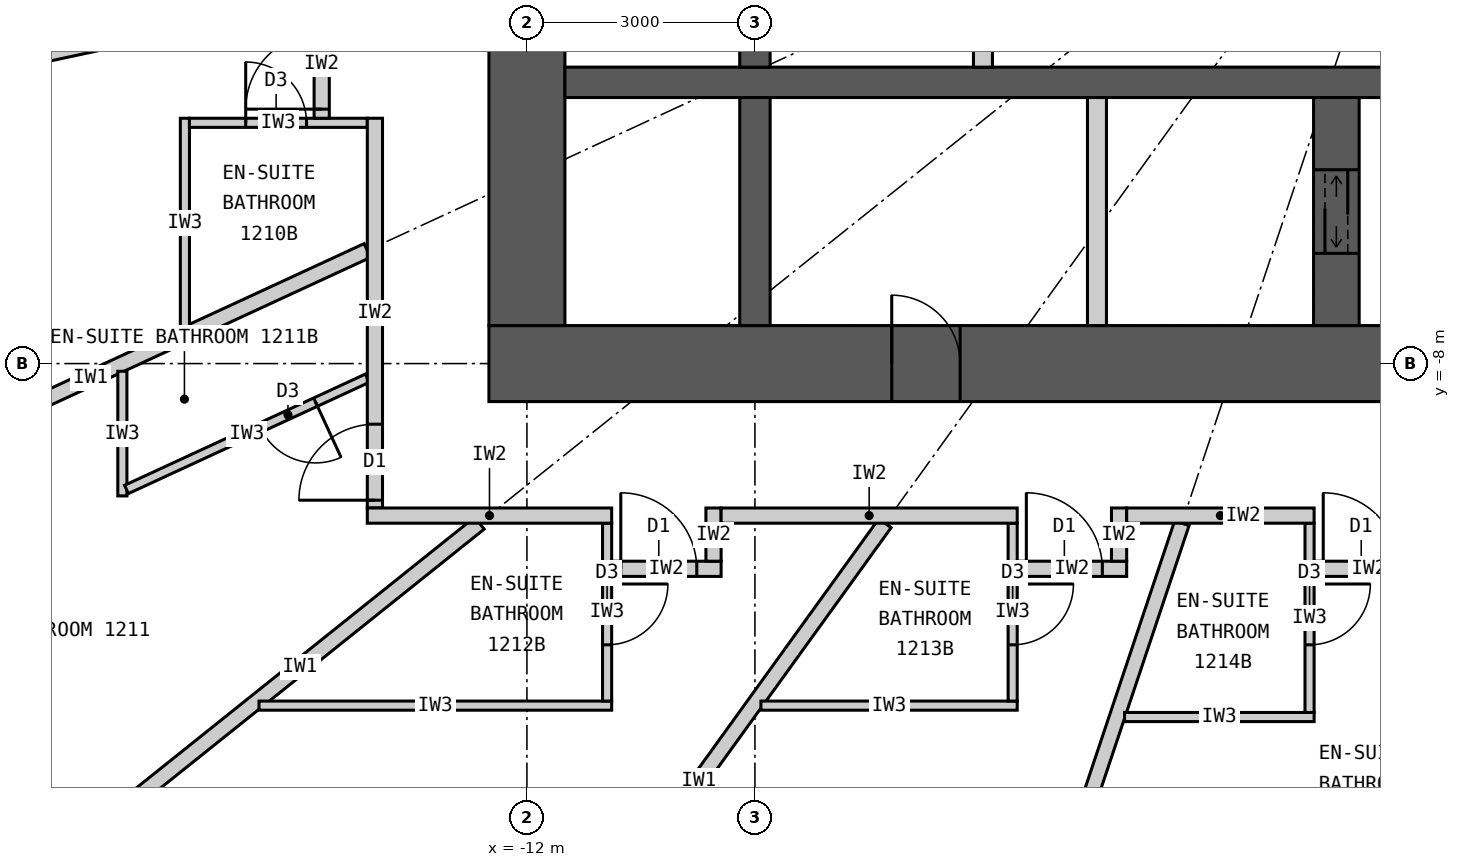
"""IFC4 building model, lengths in metres.
Left out: names, types, materials, properties, quantities, classifications, styles, units other than length and angle.
Written with IfcOpenShell. Run it as: python <this file> out.ifc"""

import sys

from ifc_helpers import new_model, si_unit, direction, frame, frame_2d, origin, place, context, subcontext, project, spatial, rectangle, extrude, element, fill, save


model = new_model("IFC4")
c1 = context("Model", 3, precision=1e-05, world=origin(), true_north=direction((0.0, 1.0)))
c2 = subcontext(c1, "Body", "Model", "MODEL_VIEW")
j1 = project(units=[si_unit("LENGTHUNIT", "METRE"), si_unit("PLANEANGLEUNIT", "RADIAN")], contexts=[c1])
p1 = place(None, origin())
s1 = spatial("IfcSite", under=j1, at=p1, CompositionType="ELEMENT")
p2 = place(p1, origin())
s2 = spatial("IfcBuilding", under=s1, at=p2, CompositionType="ELEMENT")
p3 = place(p2, frame((0.0, 0.0, 54.0)))
s3 = spatial("IfcBuildingStorey", under=s2, at=p3, CompositionType="ELEMENT", Elevation=54.0)
p4 = place(p3, frame((12.5, -8.0, 0.0), z_axis=(0.0, 0.0, 1.0), x_axis=(-1.0, 0.0, 0.0)))
e1 = element("IfcWall", 1, at=p4, inside=s3, PredefinedType="SHEAR", context=c2, shape_type="SweptSolid", body=[
    extrude(rectangle(XDim=25.0, YDim=1.0, at=frame_2d((12.5, 0.0))), origin(), (0.0, 0.0, 1.0), 3.3),
])
p5 = place(p4, frame((11.2, 0.0, 0.0)))
e2 = element("IfcOpeningElement", 2, at=p5, cuts=e1, PredefinedType="OPENING", context=c2, shape_type="SweptSolid", body=[
    extrude(rectangle(XDim=1.2, YDim=2.2, at=frame_2d((0.6, 1.1))), frame((0.0, 0.51, 0.0), z_axis=(0.0, -1.0, 0.0), x_axis=(1.0, 0.0, 0.0)), (0.0, 0.0, 1.0), 1.02),
])
p6 = place(p4, frame((18.8, 0.0, 0.0)))
e3 = element("IfcOpeningElement", 3, at=p6, cuts=e1, PredefinedType="OPENING", context=c2, shape_type="SweptSolid", body=[
    extrude(rectangle(XDim=0.9, YDim=2.2, at=frame_2d((0.45, 1.1))), frame((0.0, 0.51, 0.0), z_axis=(0.0, -1.0, 0.0), x_axis=(1.0, 0.0, 0.0)), (0.0, 0.0, 1.0), 1.02),
])
p7 = place(p3, frame((-12.0, 7.5, 0.0), z_axis=(0.0, 0.0, 1.0), x_axis=(0.0, -1.0, 0.0)))
e4 = element("IfcWall", 4, at=p7, inside=s3, PredefinedType="SHEAR", context=c2, shape_type="SweptSolid", body=[
    extrude(rectangle(XDim=15.0, YDim=1.0, at=frame_2d((7.5, 0.0))), origin(), (0.0, 0.0, 1.0), 3.3),
])
p8 = place(p7, frame((6.6, 0.0, 0.0)))
e5 = element("IfcOpeningElement", 5, at=p8, cuts=e4, PredefinedType="OPENING", context=c2, shape_type="SweptSolid", body=[
    extrude(rectangle(XDim=1.8, YDim=2.2, at=frame_2d((0.9, 1.1))), frame((0.0, 0.51, 0.0), z_axis=(0.0, -1.0, 0.0), x_axis=(1.0, 0.0, 0.0)), (0.0, 0.0, 1.0), 1.02),
])
p9 = place(p3, frame((-11.5, -4.3, 0.0), z_axis=(0.0, 0.0, 1.0), x_axis=(1.0, 0.0, 0.0)))
e6 = element("IfcWall", 6, at=p9, inside=s3, PredefinedType="SHEAR", context=c2, shape_type="SweptSolid", body=[
    extrude(rectangle(XDim=23.0, YDim=0.4, at=frame_2d((11.5, 0.0))), origin(), (0.0, 0.0, 1.0), 3.3),
])
p10 = place(p3, frame((-9.0, -4.1, 0.0), z_axis=(0.0, 0.0, 1.0), x_axis=(0.0, 1.0, 0.0)))
e7 = element("IfcWall", 7, at=p10, inside=s3, PredefinedType="SHEAR", context=c2, shape_type="SweptSolid", body=[
    extrude(rectangle(XDim=2.35, YDim=0.4, at=frame_2d((1.175, 0.0))), origin(), (0.0, 0.0, 1.0), 3.3),
])
p11 = place(p3, frame((-9.0, -7.5, 0.0), z_axis=(0.0, 0.0, 1.0), x_axis=(0.0, 1.0, 0.0)))
e8 = element("IfcWall", 8, at=p11, inside=s3, PredefinedType="SHEAR", context=c2, shape_type="SweptSolid", body=[
    extrude(rectangle(XDim=3.0, YDim=0.4, at=frame_2d((1.5, 0.0))), origin(), (0.0, 0.0, 1.0), 3.3),
])
p12 = place(p3, frame((-1.35, -7.5, 0.0), z_axis=(0.0, 0.0, 1.0), x_axis=(0.0, 1.0, 0.0)))
e9 = element("IfcWall", 9, at=p12, inside=s3, PredefinedType="SHEAR", context=c2, shape_type="SweptSolid", body=[
    extrude(rectangle(XDim=3.0, YDim=0.6, at=frame_2d((1.5, 0.0))), origin(), (0.0, 0.0, 1.0), 3.3),
])
p13 = place(p12, frame((0.95, 0.0, 0.0)))
e10 = element("IfcOpeningElement", 10, at=p13, cuts=e9, PredefinedType="OPENING", context=c2, shape_type="SweptSolid", body=[
    extrude(rectangle(XDim=1.1, YDim=2.2, at=frame_2d((0.55, 1.1))), frame((0.0, 0.31, 0.0), z_axis=(0.0, -1.0, 0.0), x_axis=(1.0, 0.0, 0.0)), (0.0, 0.0, 1.0), 0.62),
])
p14 = place(p3, frame((-4.5, -7.5, 0.0), z_axis=(0.0, 0.0, 1.0), x_axis=(0.0, 1.0, 0.0)))
e11 = element("IfcWall", 11, at=p14, inside=s3, PredefinedType="PARTITIONING", context=c2, shape_type="SweptSolid", body=[
    extrude(rectangle(XDim=3.0, YDim=0.25, at=frame_2d((1.5, 0.0))), origin(), (0.0, 0.0, 1.0), 3.3),
])
p15 = place(p3, frame((-6.0, -4.1, 0.0), z_axis=(0.0, 0.0, 1.0), x_axis=(0.0, 1.0, 0.0)))
e12 = element("IfcWall", 12, at=p15, inside=s3, PredefinedType="PARTITIONING", context=c2, shape_type="SweptSolid", body=[
    extrude(rectangle(XDim=2.35, YDim=0.25, at=frame_2d((1.175, 0.0))), origin(), (0.0, 0.0, 1.0), 3.3),
])
p16 = place(p3, frame((-14.1, -3.022, 0.0), z_axis=(0.0, 0.0, 1.0), x_axis=(-0.977790014929, -0.209586943072, 0.0)))
e13 = element("IfcWall", 13, at=p16, inside=s3, PredefinedType="PARTITIONING", context=c2, shape_type="SweptSolid", body=[
    extrude(rectangle(XDim=10.087, YDim=0.2, at=frame_2d((5.043, 0.0))), origin(), (0.0, 0.0, 1.0), 2.32),
])
p17 = place(p3, frame((-14.1, -6.512, 0.0), z_axis=(0.0, 0.0, 1.0), x_axis=(-0.907832871056, -0.419332181247, 0.0)))
e14 = element("IfcWall", 14, at=p17, inside=s3, PredefinedType="PARTITIONING", context=c2, shape_type="SweptSolid", body=[
    extrude(rectangle(XDim=8.023, YDim=0.2, at=frame_2d((4.011, 0.0))), origin(), (0.0, 0.0, 1.0), 2.32),
])
p18 = place(p3, frame((-12.625, -10.1, 0.0), z_axis=(0.0, 0.0, 1.0), x_axis=(-0.780892451574, -0.624665493744, 0.0)))
e15 = element("IfcWall", 15, at=p18, inside=s3, PredefinedType="PARTITIONING", context=c2, shape_type="SweptSolid", body=[
    extrude(rectangle(XDim=6.045, YDim=0.2, at=frame_2d((3.022, 0.0))), origin(), (0.0, 0.0, 1.0), 2.32),
])
p19 = place(p3, frame((-7.289, -10.1, 0.0), z_axis=(0.0, 0.0, 1.0), x_axis=(-0.585198353053, -0.810890182197, 0.0)))
e16 = element("IfcWall", 16, at=p19, inside=s3, PredefinedType="PARTITIONING", context=c2, shape_type="SweptSolid", body=[
    extrude(rectangle(XDim=8.36, YDim=0.2, at=frame_2d((4.18, 0.0))), origin(), (0.0, 0.0, 1.0), 2.32),
])
p20 = place(p3, frame((-3.383, -10.1, 0.0), z_axis=(0.0, 0.0, 1.0), x_axis=(-0.31759592231, -0.948226149256, 0.0)))
e17 = element("IfcWall", 17, at=p20, inside=s3, PredefinedType="PARTITIONING", context=c2, shape_type="SweptSolid", body=[
    extrude(rectangle(XDim=9.098, YDim=0.2, at=frame_2d((4.549, 0.0))), origin(), (0.0, 0.0, 1.0), 2.32),
])
p21 = place(p3, frame((-16.5, -7.521, 0.0), z_axis=(0.0, 0.0, 1.0), x_axis=(0.0, 1.0, 0.0)))
e18 = element("IfcWall", 18, at=p21, inside=s3, PredefinedType="PARTITIONING", context=c2, shape_type="SweptSolid", body=[
    extrude(rectangle(XDim=2.749, YDim=0.12, at=frame_2d((1.374, 0.0))), origin(), (0.0, 0.0, 1.0), 3.12),
])
p22 = place(p3, frame((-14.1, -4.833, 0.0), z_axis=(0.0, 0.0, 1.0), x_axis=(-1.0, 0.0, 0.0)))
e19 = element("IfcWall", 19, at=p22, inside=s3, PredefinedType="PARTITIONING", context=c2, shape_type="SweptSolid", body=[
    extrude(rectangle(XDim=2.34, YDim=0.12, at=frame_2d((1.17, 0.0))), origin(), (0.0, 0.0, 1.0), 3.12),
])
p23 = place(p22, frame((0.8, 0.0, 0.0)))
e20 = element("IfcOpeningElement", 20, at=p23, cuts=e19, PredefinedType="OPENING", context=c2, shape_type="SweptSolid", body=[
    extrude(rectangle(XDim=0.8, YDim=2.1, at=frame_2d((0.4, 1.05))), frame((0.0, 0.07, 0.0), z_axis=(0.0, -1.0, 0.0), x_axis=(1.0, 0.0, 0.0)), (0.0, 0.0, 1.0), 0.14),
])
p24 = place(p3, frame((-17.323, -8.101, 0.0), z_axis=(0.0, 0.0, 1.0), x_axis=(0.0, -1.0, 0.0)))
e21 = element("IfcWall", 21, at=p24, inside=s3, PredefinedType="PARTITIONING", context=c2, shape_type="SweptSolid", body=[
    extrude(rectangle(XDim=1.64, YDim=0.12, at=frame_2d((0.82, 0.0))), origin(), (0.0, 0.0, 1.0), 3.12),
])
p25 = place(p3, frame((-14.1, -8.193, 0.0), z_axis=(0.0, 0.0, 1.0), x_axis=(-0.907836493557, -0.419324338628, 0.0)))
e22 = element("IfcWall", 22, at=p25, inside=s3, PredefinedType="PARTITIONING", context=c2, shape_type="SweptSolid", body=[
    extrude(rectangle(XDim=3.49, YDim=0.12, at=frame_2d((1.745, 0.0))), origin(), (0.0, 0.0, 1.0), 3.12),
])
p26 = place(p25, frame((0.75, 0.0, 0.0)))
e23 = element("IfcOpeningElement", 23, at=p26, cuts=e22, PredefinedType="OPENING", context=c2, shape_type="SweptSolid", body=[
    extrude(rectangle(XDim=0.8, YDim=2.1, at=frame_2d((0.4, 1.05))), frame((0.0, 0.07, 0.0), z_axis=(0.0, -1.0, 0.0), x_axis=(1.0, 0.0, 0.0)), (0.0, 0.0, 1.0), 0.14),
])
p27 = place(p3, frame((-15.525, -12.5, 0.0), z_axis=(0.0, 0.0, 1.0), x_axis=(1.0, 0.0, 0.0)))
e24 = element("IfcWall", 24, at=p27, inside=s3, PredefinedType="PARTITIONING", context=c2, shape_type="SweptSolid", body=[
    extrude(rectangle(XDim=4.64, YDim=0.12, at=frame_2d((2.32, 0.0))), origin(), (0.0, 0.0, 1.0), 3.12),
])
p28 = place(p3, frame((-10.945, -10.1, 0.0), z_axis=(0.0, 0.0, 1.0), x_axis=(0.0, -1.0, 0.0)))
e25 = element("IfcWall", 25, at=p28, inside=s3, PredefinedType="PARTITIONING", context=c2, shape_type="SweptSolid", body=[
    extrude(rectangle(XDim=2.34, YDim=0.12, at=frame_2d((1.17, 0.0))), origin(), (0.0, 0.0, 1.0), 3.12),
])
p29 = place(p28, frame((0.8, 0.0, 0.0)))
e26 = element("IfcOpeningElement", 26, at=p29, cuts=e25, PredefinedType="OPENING", context=c2, shape_type="SweptSolid", body=[
    extrude(rectangle(XDim=0.8, YDim=2.1, at=frame_2d((0.4, 1.05))), frame((0.0, 0.07, 0.0), z_axis=(0.0, -1.0, 0.0), x_axis=(1.0, 0.0, 0.0)), (0.0, 0.0, 1.0), 0.14),
])
p30 = place(p3, frame((-8.921, -12.5, 0.0), z_axis=(0.0, 0.0, 1.0), x_axis=(1.0, 0.0, 0.0)))
e27 = element("IfcWall", 27, at=p30, inside=s3, PredefinedType="PARTITIONING", context=c2, shape_type="SweptSolid", body=[
    extrude(rectangle(XDim=3.372, YDim=0.12, at=frame_2d((1.686, 0.0))), origin(), (0.0, 0.0, 1.0), 3.12),
])
p31 = place(p3, frame((-5.609, -10.1, 0.0), z_axis=(0.0, 0.0, 1.0), x_axis=(0.0, -1.0, 0.0)))
e28 = element("IfcWall", 28, at=p31, inside=s3, PredefinedType="PARTITIONING", context=c2, shape_type="SweptSolid", body=[
    extrude(rectangle(XDim=2.34, YDim=0.12, at=frame_2d((1.17, 0.0))), origin(), (0.0, 0.0, 1.0), 3.12),
])
p32 = place(p31, frame((0.8, 0.0, 0.0)))
e29 = element("IfcOpeningElement", 29, at=p32, cuts=e28, PredefinedType="OPENING", context=c2, shape_type="SweptSolid", body=[
    extrude(rectangle(XDim=0.8, YDim=2.1, at=frame_2d((0.4, 1.05))), frame((0.0, 0.07, 0.0), z_axis=(0.0, -1.0, 0.0), x_axis=(1.0, 0.0, 0.0)), (0.0, 0.0, 1.0), 0.14),
])
p33 = place(p3, frame((-4.137, -12.65, 0.0), z_axis=(0.0, 0.0, 1.0), x_axis=(1.0, 0.0, 0.0)))
e30 = element("IfcWall", 30, at=p33, inside=s3, PredefinedType="PARTITIONING", context=c2, shape_type="SweptSolid", body=[
    extrude(rectangle(XDim=2.494, YDim=0.12, at=frame_2d((1.247, 0.0))), origin(), (0.0, 0.0, 1.0), 3.12),
])
p34 = place(p3, frame((-1.703, -10.1, 0.0), z_axis=(0.0, 0.0, 1.0), x_axis=(0.0, -1.0, 0.0)))
e31 = element("IfcWall", 31, at=p34, inside=s3, PredefinedType="PARTITIONING", context=c2, shape_type="SweptSolid", body=[
    extrude(rectangle(XDim=2.49, YDim=0.12, at=frame_2d((1.245, 0.0))), origin(), (0.0, 0.0, 1.0), 3.12),
])
p35 = place(p34, frame((0.8, 0.0, 0.0)))
e32 = element("IfcOpeningElement", 32, at=p35, cuts=e31, PredefinedType="OPENING", context=c2, shape_type="SweptSolid", body=[
    extrude(rectangle(XDim=0.8, YDim=2.1, at=frame_2d((0.4, 1.05))), frame((0.0, 0.07, 0.0), z_axis=(0.0, -1.0, 0.0), x_axis=(1.0, 0.0, 0.0)), (0.0, 0.0, 1.0), 0.14),
])
p36 = place(p3, frame((-14.7, -3.333, 0.0), z_axis=(0.0, 0.0, 1.0), x_axis=(0.0, -1.0, 0.0)))
e33 = element("IfcWall", 33, at=p36, inside=s3, PredefinedType="PARTITIONING", context=c2, shape_type="SweptSolid", body=[
    extrude(rectangle(XDim=1.44, YDim=0.2, at=frame_2d((0.72, 0.0))), origin(), (0.0, 0.0, 1.0), 3.12),
])
p37 = place(p36, frame((0.32, 0.0, 0.0)))
e34 = element("IfcOpeningElement", 34, at=p37, cuts=e33, PredefinedType="OPENING", context=c2, shape_type="SweptSolid", body=[
    extrude(rectangle(XDim=1.0, YDim=2.2, at=frame_2d((0.5, 1.1))), frame((0.0, 0.11, 0.0), z_axis=(0.0, -1.0, 0.0), x_axis=(1.0, 0.0, 0.0)), (0.0, 0.0, 1.0), 0.22),
])
p38 = place(p3, frame((-9.445, -10.7, 0.0), z_axis=(0.0, 0.0, 1.0), x_axis=(-1.0, 0.0, 0.0)))
e35 = element("IfcWall", 35, at=p38, inside=s3, PredefinedType="PARTITIONING", context=c2, shape_type="SweptSolid", body=[
    extrude(rectangle(XDim=1.44, YDim=0.2, at=frame_2d((0.72, 0.0))), origin(), (0.0, 0.0, 1.0), 3.12),
])
p39 = place(p38, frame((0.32, 0.0, 0.0)))
e36 = element("IfcOpeningElement", 36, at=p39, cuts=e35, PredefinedType="OPENING", context=c2, shape_type="SweptSolid", body=[
    extrude(rectangle(XDim=1.0, YDim=2.2, at=frame_2d((0.5, 1.1))), frame((0.0, 0.11, 0.0), z_axis=(0.0, -1.0, 0.0), x_axis=(1.0, 0.0, 0.0)), (0.0, 0.0, 1.0), 0.22),
])
p40 = place(p3, frame((-9.545, -9.9, 0.0), z_axis=(0.0, 0.0, 1.0), x_axis=(0.0, -1.0, 0.0)))
e37 = element("IfcWall", 37, at=p40, inside=s3, PredefinedType="PARTITIONING", context=c2, shape_type="SweptSolid", body=[
    extrude(rectangle(XDim=0.7, YDim=0.2, at=frame_2d((0.35, 0.0))), origin(), (0.0, 0.0, 1.0), 3.12),
])
p41 = place(p3, frame((-4.109, -10.7, 0.0), z_axis=(0.0, 0.0, 1.0), x_axis=(-1.0, 0.0, 0.0)))
e38 = element("IfcWall", 38, at=p41, inside=s3, PredefinedType="PARTITIONING", context=c2, shape_type="SweptSolid", body=[
    extrude(rectangle(XDim=1.44, YDim=0.2, at=frame_2d((0.72, 0.0))), origin(), (0.0, 0.0, 1.0), 3.12),
])
p42 = place(p41, frame((0.32, 0.0, 0.0)))
e39 = element("IfcOpeningElement", 39, at=p42, cuts=e38, PredefinedType="OPENING", context=c2, shape_type="SweptSolid", body=[
    extrude(rectangle(XDim=1.0, YDim=2.2, at=frame_2d((0.5, 1.1))), frame((0.0, 0.11, 0.0), z_axis=(0.0, -1.0, 0.0), x_axis=(1.0, 0.0, 0.0)), (0.0, 0.0, 1.0), 0.22),
])
p43 = place(p3, frame((-4.209, -9.9, 0.0), z_axis=(0.0, 0.0, 1.0), x_axis=(0.0, -1.0, 0.0)))
e40 = element("IfcWall", 40, at=p43, inside=s3, PredefinedType="PARTITIONING", context=c2, shape_type="SweptSolid", body=[
    extrude(rectangle(XDim=0.7, YDim=0.2, at=frame_2d((0.35, 0.0))), origin(), (0.0, 0.0, 1.0), 3.12),
])
p44 = place(p3, frame((-0.203, -10.7, 0.0), z_axis=(0.0, 0.0, 1.0), x_axis=(-1.0, 0.0, 0.0)))
e41 = element("IfcWall", 41, at=p44, inside=s3, PredefinedType="PARTITIONING", context=c2, shape_type="SweptSolid", body=[
    extrude(rectangle(XDim=1.44, YDim=0.2, at=frame_2d((0.72, 0.0))), origin(), (0.0, 0.0, 1.0), 3.12),
])
p45 = place(p44, frame((0.32, 0.0, 0.0)))
e42 = element("IfcOpeningElement", 42, at=p45, cuts=e41, PredefinedType="OPENING", context=c2, shape_type="SweptSolid", body=[
    extrude(rectangle(XDim=1.0, YDim=2.2, at=frame_2d((0.5, 1.1))), frame((0.0, 0.11, 0.0), z_axis=(0.0, -1.0, 0.0), x_axis=(1.0, 0.0, 0.0)), (0.0, 0.0, 1.0), 0.22),
])
p46 = place(p3, frame((-14.0, -4.772, 0.0), z_axis=(0.0, 0.0, 1.0), x_axis=(0.0, -1.0, 0.0)))
e43 = element("IfcWall", 43, at=p46, inside=s3, PredefinedType="PARTITIONING", context=c2, shape_type="SweptSolid", body=[
    extrude(rectangle(XDim=5.127, YDim=0.2, at=frame_2d((2.564, 0.0))), origin(), (0.0, 0.0, 1.0), 3.12),
])
p47 = place(p46, frame((4.025, 0.0, 0.0)))
e44 = element("IfcOpeningElement", 44, at=p47, cuts=e43, PredefinedType="OPENING", context=c2, shape_type="SweptSolid", body=[
    extrude(rectangle(XDim=1.0, YDim=2.2, at=frame_2d((0.5, 1.1))), frame((0.0, 0.11, 0.0), z_axis=(0.0, -1.0, 0.0), x_axis=(1.0, 0.0, 0.0)), (0.0, 0.0, 1.0), 0.22),
])
p48 = place(p3, frame((-1.643, -10.0, 0.0), z_axis=(0.0, 0.0, 1.0), x_axis=(-1.0, 0.0, 0.0)))
e45 = element("IfcWall", 45, at=p48, inside=s3, PredefinedType="PARTITIONING", context=c2, shape_type="SweptSolid", body=[
    extrude(rectangle(XDim=2.466, YDim=0.2, at=frame_2d((1.233, 0.0))), origin(), (0.0, 0.0, 1.0), 3.12),
])
p49 = place(p3, frame((-5.549, -10.0, 0.0), z_axis=(0.0, 0.0, 1.0), x_axis=(-1.0, 0.0, 0.0)))
e46 = element("IfcWall", 46, at=p49, inside=s3, PredefinedType="PARTITIONING", context=c2, shape_type="SweptSolid", body=[
    extrude(rectangle(XDim=3.896, YDim=0.2, at=frame_2d((1.948, 0.0))), origin(), (0.0, 0.0, 1.0), 3.12),
])
p50 = place(p3, frame((-10.885, -10.0, 0.0), z_axis=(0.0, 0.0, 1.0), x_axis=(-1.0, 0.0, 0.0)))
e47 = element("IfcWall", 47, at=p50, inside=s3, PredefinedType="PARTITIONING", context=c2, shape_type="SweptSolid", body=[
    extrude(rectangle(XDim=3.215, YDim=0.2, at=frame_2d((1.607, 0.0))), origin(), (0.0, 0.0, 1.0), 3.12),
])
p51 = place(p23, origin())
e48 = element("IfcDoor", 48, at=p51, inside=s3, OperationType="SINGLE_SWING_RIGHT", PredefinedType="DOOR", context=c2, shape_type="SweptSolid", body=[
    extrude(rectangle(XDim=0.8, YDim=2.1, at=frame_2d((0.4, 1.05))), frame((0.0, 0.025, 0.0), z_axis=(0.0, -1.0, 0.0), x_axis=(1.0, 0.0, 0.0)), (0.0, 0.0, 1.0), 0.05),
])
fill(e20, e48)
p52 = place(p37, origin())
e49 = element("IfcDoor", 49, at=p52, inside=s3, OperationType="SINGLE_SWING_RIGHT", PredefinedType="DOOR", context=c2, shape_type="SweptSolid", body=[
    extrude(rectangle(XDim=1.0, YDim=2.2, at=frame_2d((0.5, 1.1))), frame((0.0, 0.025, 0.0), z_axis=(0.0, -1.0, 0.0), x_axis=(1.0, 0.0, 0.0)), (0.0, 0.0, 1.0), 0.05),
])
fill(e34, e49)
p53 = place(p26, origin())
e50 = element("IfcDoor", 50, at=p53, inside=s3, OperationType="SINGLE_SWING_LEFT", PredefinedType="DOOR", context=c2, shape_type="SweptSolid", body=[
    extrude(rectangle(XDim=0.8, YDim=2.1, at=frame_2d((0.4, 1.05))), frame((0.0, 0.025, 0.0), z_axis=(0.0, -1.0, 0.0), x_axis=(1.0, 0.0, 0.0)), (0.0, 0.0, 1.0), 0.05),
])
fill(e23, e50)
p54 = place(p47, origin())
e51 = element("IfcDoor", 51, at=p54, inside=s3, OperationType="SINGLE_SWING_RIGHT", PredefinedType="DOOR", context=c2, shape_type="SweptSolid", body=[
    extrude(rectangle(XDim=1.0, YDim=2.2, at=frame_2d((0.5, 1.1))), frame((0.0, 0.025, 0.0), z_axis=(0.0, -1.0, 0.0), x_axis=(1.0, 0.0, 0.0)), (0.0, 0.0, 1.0), 0.05),
])
fill(e44, e51)
p55 = place(p29, origin())
e52 = element("IfcDoor", 52, at=p55, inside=s3, OperationType="SINGLE_SWING_LEFT", PredefinedType="DOOR", context=c2, shape_type="SweptSolid", body=[
    extrude(rectangle(XDim=0.8, YDim=2.1, at=frame_2d((0.4, 1.05))), frame((0.0, 0.025, 0.0), z_axis=(0.0, -1.0, 0.0), x_axis=(1.0, 0.0, 0.0)), (0.0, 0.0, 1.0), 0.05),
])
fill(e26, e52)
p56 = place(p39, origin())
e53 = element("IfcDoor", 53, at=p56, inside=s3, OperationType="SINGLE_SWING_RIGHT", PredefinedType="DOOR", context=c2, shape_type="SweptSolid", body=[
    extrude(rectangle(XDim=1.0, YDim=2.2, at=frame_2d((0.5, 1.1))), frame((0.0, 0.025, 0.0), z_axis=(0.0, -1.0, 0.0), x_axis=(1.0, 0.0, 0.0)), (0.0, 0.0, 1.0), 0.05),
])
fill(e36, e53)
p57 = place(p32, origin())
e54 = element("IfcDoor", 54, at=p57, inside=s3, OperationType="SINGLE_SWING_LEFT", PredefinedType="DOOR", context=c2, shape_type="SweptSolid", body=[
    extrude(rectangle(XDim=0.8, YDim=2.1, at=frame_2d((0.4, 1.05))), frame((0.0, 0.025, 0.0), z_axis=(0.0, -1.0, 0.0), x_axis=(1.0, 0.0, 0.0)), (0.0, 0.0, 1.0), 0.05),
])
fill(e29, e54)
p58 = place(p42, origin())
e55 = element("IfcDoor", 55, at=p58, inside=s3, OperationType="SINGLE_SWING_RIGHT", PredefinedType="DOOR", context=c2, shape_type="SweptSolid", body=[
    extrude(rectangle(XDim=1.0, YDim=2.2, at=frame_2d((0.5, 1.1))), frame((0.0, 0.025, 0.0), z_axis=(0.0, -1.0, 0.0), x_axis=(1.0, 0.0, 0.0)), (0.0, 0.0, 1.0), 0.05),
])
fill(e39, e55)
p59 = place(p35, origin())
e56 = element("IfcDoor", 56, at=p59, inside=s3, OperationType="SINGLE_SWING_LEFT", PredefinedType="DOOR", context=c2, shape_type="SweptSolid", body=[
    extrude(rectangle(XDim=0.8, YDim=2.1, at=frame_2d((0.4, 1.05))), frame((0.0, 0.025, 0.0), z_axis=(0.0, -1.0, 0.0), x_axis=(1.0, 0.0, 0.0)), (0.0, 0.0, 1.0), 0.05),
])
fill(e32, e56)
p60 = place(p45, origin())
e57 = element("IfcDoor", 57, at=p60, inside=s3, OperationType="SINGLE_SWING_RIGHT", PredefinedType="DOOR", context=c2, shape_type="SweptSolid", body=[
    extrude(rectangle(XDim=1.0, YDim=2.2, at=frame_2d((0.5, 1.1))), frame((0.0, 0.025, 0.0), z_axis=(0.0, -1.0, 0.0), x_axis=(1.0, 0.0, 0.0)), (0.0, 0.0, 1.0), 0.05),
])
fill(e42, e57)
p61 = place(p13, origin())
e58 = element("IfcDoor", 58, at=p61, inside=s3, OperationType="DOUBLE_DOOR_SLIDING", PredefinedType="DOOR", context=c2, shape_type="SweptSolid", body=[
    extrude(rectangle(XDim=1.1, YDim=2.2, at=frame_2d((0.55, 1.1))), frame((0.0, 0.025, 0.0), z_axis=(0.0, -1.0, 0.0), x_axis=(1.0, 0.0, 0.0)), (0.0, 0.0, 1.0), 0.05),
])
fill(e10, e58)
p62 = place(p6, origin())
e59 = element("IfcDoor", 59, at=p62, inside=s3, OperationType="SINGLE_SWING_RIGHT", PredefinedType="DOOR", context=c2, shape_type="SweptSolid", body=[
    extrude(rectangle(XDim=0.9, YDim=2.2, at=frame_2d((0.45, 1.1))), frame((0.0, 0.025, 0.0), z_axis=(0.0, -1.0, 0.0), x_axis=(1.0, 0.0, 0.0)), (0.0, 0.0, 1.0), 0.05),
])
fill(e3, e59)
save(model, sys.argv[1])
